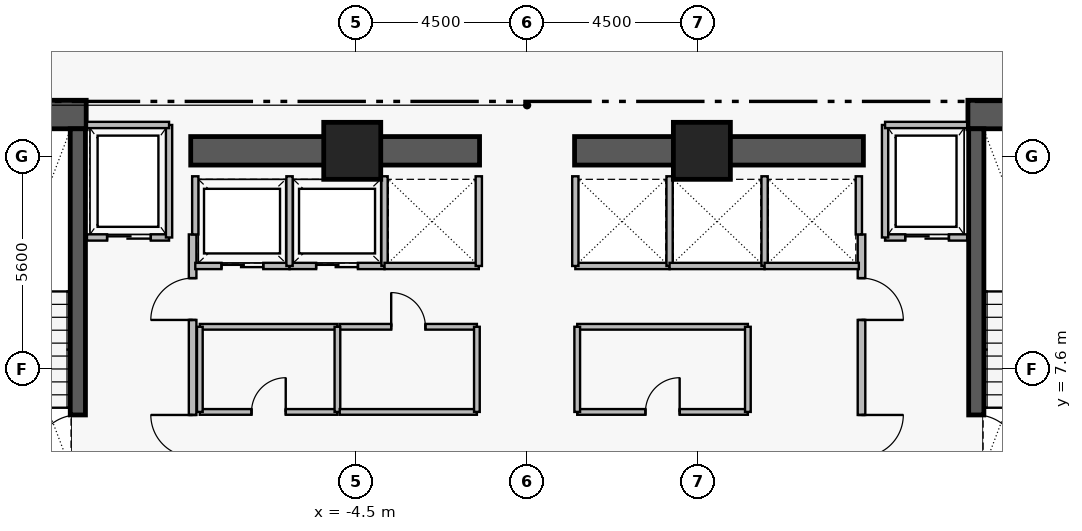
"""IFC4 building model, lengths in metres.
Left out: names, types, materials, properties, quantities, classifications, styles, units other than length and angle.
Written with IfcOpenShell. Run it as: python <this file> out.ifc"""

import sys

from ifc_helpers import new_model, si_unit, direction, frame, frame_2d, origin, origin_2d, place, context, subcontext, project, spatial, rectangle, extrude, element, fill, save


model = new_model("IFC4")
c1 = context("Model", 3, precision=1e-05, world=origin(), true_north=direction((0.0, 1.0)))
c2 = subcontext(c1, "Body", "Model", "MODEL_VIEW")
j1 = project(units=[si_unit("LENGTHUNIT", "METRE"), si_unit("PLANEANGLEUNIT", "RADIAN")], contexts=[c1])
p1 = place(None, origin())
s1 = spatial("IfcSite", under=j1, at=p1, CompositionType="ELEMENT")
p2 = place(p1, origin())
s2 = spatial("IfcBuilding", under=s1, at=p2, CompositionType="ELEMENT")
p3 = place(p2, frame((0.0, 0.0, 110.25)))
s3 = spatial("IfcBuildingStorey", under=s2, at=p3, CompositionType="ELEMENT", Elevation=110.25)
for number, where, z_axis, x_axis in (
    (1, (-16.16, 14.305, 0.0), (0.0, 0.0, 1.0), (1.0, 0.0, 0.0)),
    (2, (11.6, 14.305, 0.0), (0.0, 0.0, 1.0), (1.0, 0.0, 0.0)),
):
    element("IfcWall", number, at=place(p3, frame(where, z_axis=z_axis, x_axis=x_axis)), inside=s3, PredefinedType="SHEAR", context=c2, shape_type="SweptSolid", body=[
        extrude(rectangle(XDim=4.56, YDim=0.75, at=frame_2d((2.28, 0.0))), origin(), (0.0, 0.0, 1.0), 3.46),
    ])
for number, where, z_axis, x_axis in (
    (3, (-8.85, 13.35, 0.0), (0.0, 0.0, 1.0), (1.0, 0.0, 0.0)),
    (4, (1.25, 13.35, 0.0), (0.0, 0.0, 1.0), (1.0, 0.0, 0.0)),
):
    element("IfcWall", number, at=place(p3, frame(where, z_axis=z_axis, x_axis=x_axis)), inside=s3, PredefinedType="SHEAR", context=c2, shape_type="SweptSolid", body=[
        extrude(rectangle(XDim=7.6, YDim=0.75, at=frame_2d((3.8, 0.0))), origin(), (0.0, 0.0, 1.0), 3.43),
    ])
p4 = place(p3, frame((-11.82, 4.97, 0.0), z_axis=(0.0, 0.0, 1.0), x_axis=(0.0, 1.0, 0.0)))
e5 = element("IfcWall", 5, at=p4, inside=s3, PredefinedType="SHEAR", context=c2, shape_type="SweptSolid", body=[
    extrude(rectangle(XDim=8.96, YDim=0.4, at=frame_2d((4.48, 0.0))), origin(), (0.0, 0.0, 1.0), 3.46),
])
p5 = place(p4, frame((0.31, 0.0, 0.0)))
e6 = element("IfcOpeningElement", 6, at=p5, cuts=e5, PredefinedType="OPENING", context=c2, shape_type="SweptSolid", body=[
    extrude(rectangle(XDim=1.12, YDim=2.22, at=frame_2d((0.56, 1.11))), frame((0.0, 0.21, 0.0), z_axis=(0.0, -1.0, 0.0), x_axis=(1.0, 0.0, 0.0)), (0.0, 0.0, 1.0), 0.42),
])
p6 = place(p3, frame((11.82, 13.93, 0.0), z_axis=(0.0, 0.0, 1.0), x_axis=(0.0, -1.0, 0.0)))
e7 = element("IfcWall", 7, at=p6, inside=s3, PredefinedType="SHEAR", context=c2, shape_type="SweptSolid", body=[
    extrude(rectangle(XDim=8.96, YDim=0.4, at=frame_2d((4.48, 0.0))), origin(), (0.0, 0.0, 1.0), 3.46),
])
p7 = place(p6, frame((7.53, 0.0, 0.0)))
e8 = element("IfcOpeningElement", 8, at=p7, cuts=e7, PredefinedType="OPENING", context=c2, shape_type="SweptSolid", body=[
    extrude(rectangle(XDim=1.12, YDim=2.22, at=frame_2d((0.56, 1.11))), frame((0.0, 0.21, 0.0), z_axis=(0.0, -1.0, 0.0), x_axis=(1.0, 0.0, 0.0)), (0.0, 0.0, 1.0), 0.42),
])
for number, where, z_axis, x_axis in (
    (9, (-4.6, 13.35, 0.0), (0.0, 0.0, 1.0), (1.0, 0.0, 0.0)),
    (10, (4.6, 13.35, 0.0), (0.0, 0.0, 1.0), (1.0, 0.0, 0.0)),
):
    element("IfcColumn", number, at=place(p3, frame(where, z_axis=z_axis, x_axis=x_axis)), inside=s3, PredefinedType="COLUMN", context=c2, shape_type="SweptSolid", body=[
        extrude(rectangle(XDim=1.5, YDim=1.5, at=origin_2d()), origin(), (0.0, 0.0, 1.0), 3.65),
    ])
p8 = place(p3, frame((-8.8, 5.05, 0.0), z_axis=(0.0, 0.0, 1.0), x_axis=(0.0, 1.0, 0.0)))
e11 = element("IfcWall", 11, at=p8, inside=s3, PredefinedType="PARTITIONING", context=c2, shape_type="SweptSolid", body=[
    extrude(rectangle(XDim=6.1, YDim=0.2, at=frame_2d((3.05, 0.0))), origin(), (0.0, 0.0, 1.0), 3.43),
])
p9 = place(p8, frame((0.25, 0.0, 0.0)))
e12 = element("IfcOpeningElement", 12, at=p9, cuts=e11, PredefinedType="OPENING", context=c2, shape_type="SweptSolid", body=[
    extrude(rectangle(XDim=1.1, YDim=2.2, at=frame_2d((0.55, 1.1))), frame((0.0, 0.11, 0.0), z_axis=(0.0, -1.0, 0.0), x_axis=(1.0, 0.0, 0.0)), (0.0, 0.0, 1.0), 0.22),
])
p10 = place(p8, frame((3.85, 0.0, 0.0)))
e13 = element("IfcOpeningElement", 13, at=p10, cuts=e11, PredefinedType="OPENING", context=c2, shape_type="SweptSolid", body=[
    extrude(rectangle(XDim=1.1, YDim=2.2, at=frame_2d((0.55, 1.1))), frame((0.0, 0.11, 0.0), z_axis=(0.0, -1.0, 0.0), x_axis=(1.0, 0.0, 0.0)), (0.0, 0.0, 1.0), 0.22),
])
p11 = place(p3, frame((8.8, 11.15, 0.0), z_axis=(0.0, 0.0, 1.0), x_axis=(0.0, -1.0, 0.0)))
e14 = element("IfcWall", 14, at=p11, inside=s3, PredefinedType="PARTITIONING", context=c2, shape_type="SweptSolid", body=[
    extrude(rectangle(XDim=6.1, YDim=0.2, at=frame_2d((3.05, 0.0))), origin(), (0.0, 0.0, 1.0), 3.43),
])
p12 = place(p11, frame((1.15, 0.0, 0.0)))
e15 = element("IfcOpeningElement", 15, at=p12, cuts=e14, PredefinedType="OPENING", context=c2, shape_type="SweptSolid", body=[
    extrude(rectangle(XDim=1.1, YDim=2.2, at=frame_2d((0.55, 1.1))), frame((0.0, 0.11, 0.0), z_axis=(0.0, -1.0, 0.0), x_axis=(1.0, 0.0, 0.0)), (0.0, 0.0, 1.0), 0.22),
])
p13 = place(p11, frame((4.75, 0.0, 0.0)))
e16 = element("IfcOpeningElement", 16, at=p13, cuts=e14, PredefinedType="OPENING", context=c2, shape_type="SweptSolid", body=[
    extrude(rectangle(XDim=1.1, YDim=2.2, at=frame_2d((0.55, 1.1))), frame((0.0, 0.11, 0.0), z_axis=(0.0, -1.0, 0.0), x_axis=(1.0, 0.0, 0.0)), (0.0, 0.0, 1.0), 0.22),
])
p14 = place(p3, frame((-11.58, 11.07, 0.0), z_axis=(0.0, 0.0, 1.0), x_axis=(1.0, 0.0, 0.0)))
e17 = element("IfcWall", 17, at=p14, inside=s3, PredefinedType="PARTITIONING", context=c2, shape_type="SweptSolid", body=[
    extrude(rectangle(XDim=2.16, YDim=0.165, at=frame_2d((1.08, 0.0))), origin(), (0.0, 0.0, 1.0), 3.43),
])
p15 = place(p14, frame((0.53, 0.0, 0.0)))
e18 = element("IfcOpeningElement", 18, at=p15, cuts=e17, PredefinedType="OPENING", context=c2, shape_type="SweptSolid", body=[
    extrude(rectangle(XDim=1.15, YDim=2.25, at=frame_2d((0.575, 1.125))), frame((0.0, 0.093, 0.0), z_axis=(0.0, -1.0, 0.0), x_axis=(1.0, 0.0, 0.0)), (0.0, 0.0, 1.0), 0.185),
])
p16 = place(p3, frame((9.42, 11.07, 0.0), z_axis=(0.0, 0.0, 1.0), x_axis=(1.0, 0.0, 0.0)))
e19 = element("IfcWall", 19, at=p16, inside=s3, PredefinedType="PARTITIONING", context=c2, shape_type="SweptSolid", body=[
    extrude(rectangle(XDim=2.16, YDim=0.165, at=frame_2d((1.08, 0.0))), origin(), (0.0, 0.0, 1.0), 3.43),
])
p17 = place(p16, frame((0.53, 0.0, 0.0)))
e20 = element("IfcOpeningElement", 20, at=p17, cuts=e19, PredefinedType="OPENING", context=c2, shape_type="SweptSolid", body=[
    extrude(rectangle(XDim=1.15, YDim=2.25, at=frame_2d((0.575, 1.125))), frame((0.0, 0.093, 0.0), z_axis=(0.0, -1.0, 0.0), x_axis=(1.0, 0.0, 0.0)), (0.0, 0.0, 1.0), 0.185),
])
p18 = place(p3, frame((-8.73, 10.32, 0.0), z_axis=(0.0, 0.0, 1.0), x_axis=(1.0, 0.0, 0.0)))
e21 = element("IfcWall", 21, at=p18, inside=s3, PredefinedType="PARTITIONING", context=c2, shape_type="SweptSolid", body=[
    extrude(rectangle(XDim=2.48, YDim=0.165, at=frame_2d((1.24, 0.0))), origin(), (0.0, 0.0, 1.0), 3.43),
])
p19 = place(p18, frame((0.69, 0.0, 0.0)))
e22 = element("IfcOpeningElement", 22, at=p19, cuts=e21, PredefinedType="OPENING", context=c2, shape_type="SweptSolid", body=[
    extrude(rectangle(XDim=1.1, YDim=2.25, at=frame_2d((0.55, 1.125))), frame((0.0, 0.093, 0.0), z_axis=(0.0, -1.0, 0.0), x_axis=(1.0, 0.0, 0.0)), (0.0, 0.0, 1.0), 0.185),
])
p20 = place(p3, frame((-6.25, 10.32, 0.0), z_axis=(0.0, 0.0, 1.0), x_axis=(1.0, 0.0, 0.0)))
e23 = element("IfcWall", 23, at=p20, inside=s3, PredefinedType="PARTITIONING", context=c2, shape_type="SweptSolid", body=[
    extrude(rectangle(XDim=2.5, YDim=0.165, at=frame_2d((1.25, 0.0))), origin(), (0.0, 0.0, 1.0), 3.43),
])
p21 = place(p20, frame((0.7, 0.0, 0.0)))
e24 = element("IfcOpeningElement", 24, at=p21, cuts=e23, PredefinedType="OPENING", context=c2, shape_type="SweptSolid", body=[
    extrude(rectangle(XDim=1.1, YDim=2.25, at=frame_2d((0.55, 1.125))), frame((0.0, 0.093, 0.0), z_axis=(0.0, -1.0, 0.0), x_axis=(1.0, 0.0, 0.0)), (0.0, 0.0, 1.0), 0.185),
])
p22 = place(p3, frame((-8.61, 6.48, 0.0), z_axis=(0.0, 0.0, 1.0), x_axis=(1.0, 0.0, 0.0)))
e25 = element("IfcWall", 25, at=p22, inside=s3, PredefinedType="PARTITIONING", context=c2, shape_type="SweptSolid", body=[
    extrude(rectangle(XDim=3.62, YDim=0.15, at=frame_2d((1.81, 0.0))), origin(), (0.0, 0.0, 1.0), 3.43),
])
p23 = place(p22, frame((1.36, 0.0, 0.0)))
e26 = element("IfcOpeningElement", 26, at=p23, cuts=e25, PredefinedType="OPENING", context=c2, shape_type="SweptSolid", body=[
    extrude(rectangle(XDim=0.9, YDim=2.15, at=frame_2d((0.45, 1.075))), frame((0.0, 0.085, 0.0), z_axis=(0.0, -1.0, 0.0), x_axis=(1.0, 0.0, 0.0)), (0.0, 0.0, 1.0), 0.17),
])
p24 = place(p3, frame((-4.93, 8.72, 0.0), z_axis=(0.0, 0.0, 1.0), x_axis=(1.0, 0.0, 0.0)))
e27 = element("IfcWall", 27, at=p24, inside=s3, PredefinedType="PARTITIONING", context=c2, shape_type="SweptSolid", body=[
    extrude(rectangle(XDim=3.61, YDim=0.15, at=frame_2d((1.805, 0.0))), origin(), (0.0, 0.0, 1.0), 3.43),
])
p25 = place(p24, frame((1.355, 0.0, 0.0)))
e28 = element("IfcOpeningElement", 28, at=p25, cuts=e27, PredefinedType="OPENING", context=c2, shape_type="SweptSolid", body=[
    extrude(rectangle(XDim=0.9, YDim=2.15, at=frame_2d((0.45, 1.075))), frame((0.0, 0.085, 0.0), z_axis=(0.0, -1.0, 0.0), x_axis=(1.0, 0.0, 0.0)), (0.0, 0.0, 1.0), 0.17),
])
p26 = place(p3, frame((1.32, 6.48, 0.0), z_axis=(0.0, 0.0, 1.0), x_axis=(1.0, 0.0, 0.0)))
e29 = element("IfcWall", 29, at=p26, inside=s3, PredefinedType="PARTITIONING", context=c2, shape_type="SweptSolid", body=[
    extrude(rectangle(XDim=4.49, YDim=0.15, at=frame_2d((2.245, 0.0))), origin(), (0.0, 0.0, 1.0), 3.43),
])
p27 = place(p26, frame((1.795, 0.0, 0.0)))
e30 = element("IfcOpeningElement", 30, at=p27, cuts=e29, PredefinedType="OPENING", context=c2, shape_type="SweptSolid", body=[
    extrude(rectangle(XDim=0.9, YDim=2.15, at=frame_2d((0.45, 1.075))), frame((0.0, 0.085, 0.0), z_axis=(0.0, -1.0, 0.0), x_axis=(1.0, 0.0, 0.0)), (0.0, 0.0, 1.0), 0.17),
])
p28 = place(p3, frame((-9.42, 11.07, 0.0), z_axis=(0.0, 0.0, 1.0), x_axis=(0.0, 1.0, 0.0)))
e31 = element("IfcWall", 31, at=p28, inside=s3, PredefinedType="PARTITIONING", context=c2, shape_type="SweptSolid", body=[
    extrude(rectangle(XDim=2.96, YDim=0.165, at=frame_2d((1.48, 0.0))), origin(), (0.0, 0.0, 1.0), 3.43),
])
p29 = place(p3, frame((-11.58, 14.03, 0.0), z_axis=(0.0, 0.0, 1.0), x_axis=(1.0, 0.0, 0.0)))
e32 = element("IfcWall", 32, at=p29, inside=s3, PredefinedType="PARTITIONING", context=c2, shape_type="SweptSolid", body=[
    extrude(rectangle(XDim=2.16, YDim=0.165, at=frame_2d((1.08, 0.0))), origin(), (0.0, 0.0, 1.0), 3.43),
])
p30 = place(p3, frame((9.42, 11.07, 0.0), z_axis=(0.0, 0.0, 1.0), x_axis=(0.0, 1.0, 0.0)))
e33 = element("IfcWall", 33, at=p30, inside=s3, PredefinedType="PARTITIONING", context=c2, shape_type="SweptSolid", body=[
    extrude(rectangle(XDim=2.96, YDim=0.165, at=frame_2d((1.48, 0.0))), origin(), (0.0, 0.0, 1.0), 3.43),
])
p31 = place(p3, frame((9.42, 14.03, 0.0), z_axis=(0.0, 0.0, 1.0), x_axis=(1.0, 0.0, 0.0)))
e34 = element("IfcWall", 34, at=p31, inside=s3, PredefinedType="PARTITIONING", context=c2, shape_type="SweptSolid", body=[
    extrude(rectangle(XDim=2.16, YDim=0.165, at=frame_2d((1.08, 0.0))), origin(), (0.0, 0.0, 1.0), 3.43),
])
p32 = place(p3, frame((-8.73, 11.15, 0.0), z_axis=(0.0, 0.0, 1.0), x_axis=(0.0, 1.0, 0.0)))
e35 = element("IfcWall", 35, at=p32, inside=s3, PredefinedType="PARTITIONING", context=c2, shape_type="SweptSolid", body=[
    extrude(rectangle(XDim=1.53, YDim=0.165, at=frame_2d((0.765, 0.0))), origin(), (0.0, 0.0, 1.0), 3.43),
])
for number, where, z_axis, x_axis in (
    (36, (-6.25, 10.32, 0.0), (0.0, 0.0, 1.0), (0.0, 1.0, 0.0)),
    (37, (-3.75, 10.32, 0.0), (0.0, 0.0, 1.0), (0.0, 1.0, 0.0)),
):
    element("IfcWall", number, at=place(p3, frame(where, z_axis=z_axis, x_axis=x_axis)), inside=s3, PredefinedType="PARTITIONING", context=c2, shape_type="SweptSolid", body=[
        extrude(rectangle(XDim=2.36, YDim=0.165, at=frame_2d((1.18, 0.0))), origin(), (0.0, 0.0, 1.0), 3.43),
    ])
p33 = place(p3, frame((-3.75, 10.32, 0.0), z_axis=(0.0, 0.0, 1.0), x_axis=(1.0, 0.0, 0.0)))
e38 = element("IfcWall", 38, at=p33, inside=s3, PredefinedType="PARTITIONING", context=c2, shape_type="SweptSolid", body=[
    extrude(rectangle(XDim=2.48, YDim=0.165, at=frame_2d((1.24, 0.0))), origin(), (0.0, 0.0, 1.0), 3.43),
])
p34 = place(p3, frame((-1.27, 10.32, 0.0), z_axis=(0.0, 0.0, 1.0), x_axis=(0.0, 1.0, 0.0)))
e39 = element("IfcWall", 39, at=p34, inside=s3, PredefinedType="PARTITIONING", context=c2, shape_type="SweptSolid", body=[
    extrude(rectangle(XDim=2.36, YDim=0.165, at=frame_2d((1.18, 0.0))), origin(), (0.0, 0.0, 1.0), 3.43),
])
p35 = place(p3, frame((1.27, 10.32, 0.0), z_axis=(0.0, 0.0, 1.0), x_axis=(1.0, 0.0, 0.0)))
e40 = element("IfcWall", 40, at=p35, inside=s3, PredefinedType="PARTITIONING", context=c2, shape_type="SweptSolid", body=[
    extrude(rectangle(XDim=2.48, YDim=0.165, at=frame_2d((1.24, 0.0))), origin(), (0.0, 0.0, 1.0), 3.43),
])
for number, where, z_axis, x_axis in (
    (41, (1.27, 10.32, 0.0), (0.0, 0.0, 1.0), (0.0, 1.0, 0.0)),
    (42, (3.75, 10.32, 0.0), (0.0, 0.0, 1.0), (0.0, 1.0, 0.0)),
):
    element("IfcWall", number, at=place(p3, frame(where, z_axis=z_axis, x_axis=x_axis)), inside=s3, PredefinedType="PARTITIONING", context=c2, shape_type="SweptSolid", body=[
        extrude(rectangle(XDim=2.36, YDim=0.165, at=frame_2d((1.18, 0.0))), origin(), (0.0, 0.0, 1.0), 3.43),
    ])
p36 = place(p3, frame((3.75, 10.32, 0.0), z_axis=(0.0, 0.0, 1.0), x_axis=(1.0, 0.0, 0.0)))
e43 = element("IfcWall", 43, at=p36, inside=s3, PredefinedType="PARTITIONING", context=c2, shape_type="SweptSolid", body=[
    extrude(rectangle(XDim=2.5, YDim=0.165, at=frame_2d((1.25, 0.0))), origin(), (0.0, 0.0, 1.0), 3.43),
])
p37 = place(p3, frame((6.25, 10.32, 0.0), z_axis=(0.0, 0.0, 1.0), x_axis=(0.0, 1.0, 0.0)))
e44 = element("IfcWall", 44, at=p37, inside=s3, PredefinedType="PARTITIONING", context=c2, shape_type="SweptSolid", body=[
    extrude(rectangle(XDim=2.36, YDim=0.165, at=frame_2d((1.18, 0.0))), origin(), (0.0, 0.0, 1.0), 3.43),
])
p38 = place(p3, frame((6.25, 10.32, 0.0), z_axis=(0.0, 0.0, 1.0), x_axis=(1.0, 0.0, 0.0)))
e45 = element("IfcWall", 45, at=p38, inside=s3, PredefinedType="PARTITIONING", context=c2, shape_type="SweptSolid", body=[
    extrude(rectangle(XDim=2.48, YDim=0.165, at=frame_2d((1.24, 0.0))), origin(), (0.0, 0.0, 1.0), 3.43),
])
p39 = place(p3, frame((8.73, 11.15, 0.0), z_axis=(0.0, 0.0, 1.0), x_axis=(0.0, 1.0, 0.0)))
e46 = element("IfcWall", 46, at=p39, inside=s3, PredefinedType="PARTITIONING", context=c2, shape_type="SweptSolid", body=[
    extrude(rectangle(XDim=1.53, YDim=0.165, at=frame_2d((0.765, 0.0))), origin(), (0.0, 0.0, 1.0), 3.43),
])
p40 = place(p3, frame((-8.61, 8.72, 0.0), z_axis=(0.0, 0.0, 1.0), x_axis=(1.0, 0.0, 0.0)))
e47 = element("IfcWall", 47, at=p40, inside=s3, PredefinedType="PARTITIONING", context=c2, shape_type="SweptSolid", body=[
    extrude(rectangle(XDim=3.62, YDim=0.15, at=frame_2d((1.81, 0.0))), origin(), (0.0, 0.0, 1.0), 3.43),
])
for number, where, z_axis, x_axis in (
    (48, (-8.61, 6.48, 0.0), (0.0, 0.0, 1.0), (0.0, 1.0, 0.0)),
    (49, (-4.99, 6.48, 0.0), (0.0, 0.0, 1.0), (0.0, 1.0, 0.0)),
):
    element("IfcWall", number, at=place(p3, frame(where, z_axis=z_axis, x_axis=x_axis)), inside=s3, PredefinedType="PARTITIONING", context=c2, shape_type="SweptSolid", body=[
        extrude(rectangle(XDim=2.24, YDim=0.15, at=frame_2d((1.12, 0.0))), origin(), (0.0, 0.0, 1.0), 3.43),
    ])
p41 = place(p3, frame((-4.93, 6.48, 0.0), z_axis=(0.0, 0.0, 1.0), x_axis=(1.0, 0.0, 0.0)))
e50 = element("IfcWall", 50, at=p41, inside=s3, PredefinedType="PARTITIONING", context=c2, shape_type="SweptSolid", body=[
    extrude(rectangle(XDim=3.61, YDim=0.15, at=frame_2d((1.805, 0.0))), origin(), (0.0, 0.0, 1.0), 3.43),
])
p42 = place(p3, frame((-1.32, 6.48, 0.0), z_axis=(0.0, 0.0, 1.0), x_axis=(0.0, 1.0, 0.0)))
e51 = element("IfcWall", 51, at=p42, inside=s3, PredefinedType="PARTITIONING", context=c2, shape_type="SweptSolid", body=[
    extrude(rectangle(XDim=2.24, YDim=0.15, at=frame_2d((1.12, 0.0))), origin(), (0.0, 0.0, 1.0), 3.43),
])
p43 = place(p3, frame((1.32, 8.72, 0.0), z_axis=(0.0, 0.0, 1.0), x_axis=(1.0, 0.0, 0.0)))
e52 = element("IfcWall", 52, at=p43, inside=s3, PredefinedType="PARTITIONING", context=c2, shape_type="SweptSolid", body=[
    extrude(rectangle(XDim=4.49, YDim=0.15, at=frame_2d((2.245, 0.0))), origin(), (0.0, 0.0, 1.0), 3.43),
])
for number, where, z_axis, x_axis in (
    (53, (1.32, 6.48, 0.0), (0.0, 0.0, 1.0), (0.0, 1.0, 0.0)),
    (54, (5.81, 6.48, 0.0), (0.0, 0.0, 1.0), (0.0, 1.0, 0.0)),
):
    element("IfcWall", number, at=place(p3, frame(where, z_axis=z_axis, x_axis=x_axis)), inside=s3, PredefinedType="PARTITIONING", context=c2, shape_type="SweptSolid", body=[
        extrude(rectangle(XDim=2.24, YDim=0.15, at=frame_2d((1.12, 0.0))), origin(), (0.0, 0.0, 1.0), 3.43),
    ])
p44 = place(p5, origin())
e55 = element("IfcDoor", 55, at=p44, inside=s3, OperationType="SINGLE_SWING_LEFT", PredefinedType="DOOR", context=c2, shape_type="SweptSolid", body=[
    extrude(rectangle(XDim=1.12, YDim=2.22, at=frame_2d((0.56, 1.11))), frame((0.0, 0.025, 0.0), z_axis=(0.0, -1.0, 0.0), x_axis=(1.0, 0.0, 0.0)), (0.0, 0.0, 1.0), 0.05),
])
fill(e6, e55)
p45 = place(p7, origin())
e56 = element("IfcDoor", 56, at=p45, inside=s3, OperationType="SINGLE_SWING_RIGHT", PredefinedType="DOOR", context=c2, shape_type="SweptSolid", body=[
    extrude(rectangle(XDim=1.12, YDim=2.22, at=frame_2d((0.56, 1.11))), frame((0.0, 0.025, 0.0), z_axis=(0.0, -1.0, 0.0), x_axis=(1.0, 0.0, 0.0)), (0.0, 0.0, 1.0), 0.05),
])
fill(e8, e56)
p46 = place(p9, origin())
e57 = element("IfcDoor", 57, at=p46, inside=s3, OperationType="SINGLE_SWING_RIGHT", PredefinedType="DOOR", context=c2, shape_type="SweptSolid", body=[
    extrude(rectangle(XDim=1.1, YDim=2.2, at=frame_2d((0.55, 1.1))), frame((0.0, 0.025, 0.0), z_axis=(0.0, -1.0, 0.0), x_axis=(1.0, 0.0, 0.0)), (0.0, 0.0, 1.0), 0.05),
])
fill(e12, e57)
p47 = place(p10, origin())
e58 = element("IfcDoor", 58, at=p47, inside=s3, OperationType="SINGLE_SWING_LEFT", PredefinedType="DOOR", context=c2, shape_type="SweptSolid", body=[
    extrude(rectangle(XDim=1.1, YDim=2.2, at=frame_2d((0.55, 1.1))), frame((0.0, 0.025, 0.0), z_axis=(0.0, -1.0, 0.0), x_axis=(1.0, 0.0, 0.0)), (0.0, 0.0, 1.0), 0.05),
])
fill(e13, e58)
p48 = place(p12, origin())
e59 = element("IfcDoor", 59, at=p48, inside=s3, OperationType="SINGLE_SWING_RIGHT", PredefinedType="DOOR", context=c2, shape_type="SweptSolid", body=[
    extrude(rectangle(XDim=1.1, YDim=2.2, at=frame_2d((0.55, 1.1))), frame((0.0, 0.025, 0.0), z_axis=(0.0, -1.0, 0.0), x_axis=(1.0, 0.0, 0.0)), (0.0, 0.0, 1.0), 0.05),
])
fill(e15, e59)
p49 = place(p13, origin())
e60 = element("IfcDoor", 60, at=p49, inside=s3, OperationType="SINGLE_SWING_LEFT", PredefinedType="DOOR", context=c2, shape_type="SweptSolid", body=[
    extrude(rectangle(XDim=1.1, YDim=2.2, at=frame_2d((0.55, 1.1))), frame((0.0, 0.025, 0.0), z_axis=(0.0, -1.0, 0.0), x_axis=(1.0, 0.0, 0.0)), (0.0, 0.0, 1.0), 0.05),
])
fill(e16, e60)
p50 = place(p15, origin())
e61 = element("IfcDoor", 61, at=p50, inside=s3, OperationType="SLIDING_TO_LEFT", PredefinedType="DOOR", context=c2, shape_type="SweptSolid", body=[
    extrude(rectangle(XDim=1.15, YDim=2.25, at=frame_2d((0.575, 1.125))), frame((0.0, 0.025, 0.0), z_axis=(0.0, -1.0, 0.0), x_axis=(1.0, 0.0, 0.0)), (0.0, 0.0, 1.0), 0.05),
])
fill(e18, e61)
p51 = place(p17, origin())
e62 = element("IfcDoor", 62, at=p51, inside=s3, OperationType="SLIDING_TO_LEFT", PredefinedType="DOOR", context=c2, shape_type="SweptSolid", body=[
    extrude(rectangle(XDim=1.15, YDim=2.25, at=frame_2d((0.575, 1.125))), frame((0.0, 0.025, 0.0), z_axis=(0.0, -1.0, 0.0), x_axis=(1.0, 0.0, 0.0)), (0.0, 0.0, 1.0), 0.05),
])
fill(e20, e62)
p52 = place(p19, origin())
e63 = element("IfcDoor", 63, at=p52, inside=s3, OperationType="SLIDING_TO_LEFT", PredefinedType="DOOR", context=c2, shape_type="SweptSolid", body=[
    extrude(rectangle(XDim=1.1, YDim=2.25, at=frame_2d((0.55, 1.125))), frame((0.0, 0.025, 0.0), z_axis=(0.0, -1.0, 0.0), x_axis=(1.0, 0.0, 0.0)), (0.0, 0.0, 1.0), 0.05),
])
fill(e22, e63)
p53 = place(p21, origin())
e64 = element("IfcDoor", 64, at=p53, inside=s3, OperationType="SLIDING_TO_LEFT", PredefinedType="DOOR", context=c2, shape_type="SweptSolid", body=[
    extrude(rectangle(XDim=1.1, YDim=2.25, at=frame_2d((0.55, 1.125))), frame((0.0, 0.025, 0.0), z_axis=(0.0, -1.0, 0.0), x_axis=(1.0, 0.0, 0.0)), (0.0, 0.0, 1.0), 0.05),
])
fill(e24, e64)
p54 = place(p23, origin())
e65 = element("IfcDoor", 65, at=p54, inside=s3, OperationType="SINGLE_SWING_RIGHT", PredefinedType="DOOR", context=c2, shape_type="SweptSolid", body=[
    extrude(rectangle(XDim=0.9, YDim=2.15, at=frame_2d((0.45, 1.075))), frame((0.0, 0.025, 0.0), z_axis=(0.0, -1.0, 0.0), x_axis=(1.0, 0.0, 0.0)), (0.0, 0.0, 1.0), 0.05),
])
fill(e26, e65)
p55 = place(p25, origin())
e66 = element("IfcDoor", 66, at=p55, inside=s3, OperationType="SINGLE_SWING_LEFT", PredefinedType="DOOR", context=c2, shape_type="SweptSolid", body=[
    extrude(rectangle(XDim=0.9, YDim=2.15, at=frame_2d((0.45, 1.075))), frame((0.0, 0.025, 0.0), z_axis=(0.0, -1.0, 0.0), x_axis=(1.0, 0.0, 0.0)), (0.0, 0.0, 1.0), 0.05),
])
fill(e28, e66)
p56 = place(p27, origin())
e67 = element("IfcDoor", 67, at=p56, inside=s3, OperationType="SINGLE_SWING_RIGHT", PredefinedType="DOOR", context=c2, shape_type="SweptSolid", body=[
    extrude(rectangle(XDim=0.9, YDim=2.15, at=frame_2d((0.45, 1.075))), frame((0.0, 0.025, 0.0), z_axis=(0.0, -1.0, 0.0), x_axis=(1.0, 0.0, 0.0)), (0.0, 0.0, 1.0), 0.05),
])
fill(e30, e67)
save(model, sys.argv[1])
